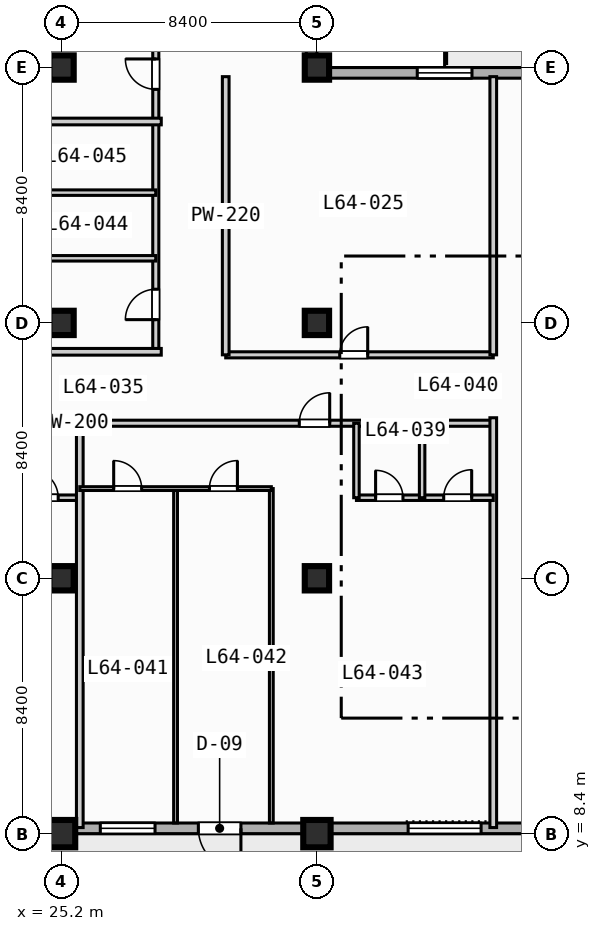
"""IFC4 building model, lengths in metres.
Left out: names, types, materials, properties, quantities, classifications, styles, units other than length and angle.
Written with IfcOpenShell. Run it as: python <this file> out.ifc"""

import sys

from ifc_helpers import new_model, si_unit, direction, frame, frame_2d, origin, origin_2d, place, context, subcontext, project, spatial, rectangle, extrude, element, fill, save


model = new_model("IFC4")
c1 = context("Model", 3, precision=1e-05, world=origin(), true_north=direction((0.0, 1.0)))
c2 = subcontext(c1, "Body", "Model", "MODEL_VIEW")
j1 = project(units=[si_unit("LENGTHUNIT", "METRE"), si_unit("PLANEANGLEUNIT", "RADIAN")], contexts=[c1])
p1 = place(None, origin())
s1 = spatial("IfcSite", under=j1, at=p1, CompositionType="ELEMENT")
p2 = place(p1, origin())
s2 = spatial("IfcBuilding", under=s1, at=p2, CompositionType="ELEMENT")
p3 = place(p2, frame((0.0, 0.0, 260.1)))
s3 = spatial("IfcBuildingStorey", under=s2, at=p3, CompositionType="ELEMENT", Elevation=260.1)
p4 = place(p3, frame((25.2, 8.4, 0.0), z_axis=(0.0, 0.0, 1.0), x_axis=(1.0, 0.0, 0.0)))
e1 = element("IfcColumn", 1, at=p4, inside=s3, PredefinedType="COLUMN", context=c2, shape_type="SweptSolid", body=[
    extrude(rectangle(XDim=0.9, YDim=0.9, at=origin_2d()), origin(), (0.0, 0.0, 1.0), 3.7),
])
for number, where, z_axis, x_axis in (
    (2, (25.2, 16.8, 0.0), (0.0, 0.0, 1.0), (1.0, 0.0, 0.0)),
    (3, (25.2, 25.2, 0.0), (0.0, 0.0, 1.0), (1.0, 0.0, 0.0)),
    (4, (25.2, 33.6, 0.0), (0.0, 0.0, 1.0), (1.0, 0.0, 0.0)),
):
    element("IfcColumn", number, at=place(p3, frame(where, z_axis=z_axis, x_axis=x_axis)), inside=s3, PredefinedType="COLUMN", context=c2, shape_type="SweptSolid", body=[
        extrude(rectangle(XDim=0.8, YDim=0.8, at=origin_2d()), origin(), (0.0, 0.0, 1.0), 3.7),
    ])
p5 = place(p3, frame((33.6, 8.4, 0.0), z_axis=(0.0, 0.0, 1.0), x_axis=(1.0, 0.0, 0.0)))
e5 = element("IfcColumn", 5, at=p5, inside=s3, PredefinedType="COLUMN", context=c2, shape_type="SweptSolid", body=[
    extrude(rectangle(XDim=0.9, YDim=0.9, at=origin_2d()), origin(), (0.0, 0.0, 1.0), 3.7),
])
for number, where, z_axis, x_axis in (
    (6, (33.6, 16.8, 0.0), (0.0, 0.0, 1.0), (1.0, 0.0, 0.0)),
    (7, (33.6, 25.2, 0.0), (0.0, 0.0, 1.0), (1.0, 0.0, 0.0)),
    (8, (33.6, 33.6, 0.0), (0.0, 0.0, 1.0), (1.0, 0.0, 0.0)),
):
    element("IfcColumn", number, at=place(p3, frame(where, z_axis=z_axis, x_axis=x_axis)), inside=s3, PredefinedType="COLUMN", context=c2, shape_type="SweptSolid", body=[
        extrude(rectangle(XDim=0.8, YDim=0.8, at=origin_2d()), origin(), (0.0, 0.0, 1.0), 3.7),
    ])
p6 = place(p3, frame((33.425, 72.425, 0.0), z_axis=(0.0, 0.0, 1.0), x_axis=(0.0, -1.0, 0.0)))
e9 = element("IfcWall", 9, at=p6, inside=s3, PredefinedType="STANDARD", context=c2, shape_type="SweptSolid", body=[
    extrude(rectangle(XDim=39.0, YDim=0.35, at=frame_2d((19.5, 0.0))), origin(), (0.0, 0.0, 1.0), 3.47),
])
p7 = place(p6, frame((5.9, 0.0, 0.85)))
e10 = element("IfcOpeningElement", 10, at=p7, cuts=e9, PredefinedType="OPENING", context=c2, shape_type="SweptSolid", body=[
    extrude(rectangle(XDim=1.8, YDim=1.8, at=frame_2d((0.9, 0.9))), frame((0.0, 0.185, 0.0), z_axis=(0.0, -1.0, 0.0), x_axis=(1.0, 0.0, 0.0)), (0.0, 0.0, 1.0), 0.37),
])
p8 = place(p3, frame((33.425, 33.425, 0.0), z_axis=(0.0, 0.0, 1.0), x_axis=(1.0, 0.0, 0.0)))
e11 = element("IfcWall", 11, at=p8, inside=s3, PredefinedType="STANDARD", context=c2, shape_type="SweptSolid", body=[
    extrude(rectangle(XDim=39.0, YDim=0.35, at=frame_2d((19.5, 0.0))), origin(), (0.0, 0.0, 1.0), 3.47),
])
p9 = place(p8, frame((12.075, 0.0, 0.0)))
e12 = element("IfcOpeningElement", 12, at=p9, cuts=e11, PredefinedType="OPENING", context=c2, shape_type="SweptSolid", body=[
    extrude(rectangle(XDim=1.4, YDim=2.2, at=frame_2d((0.7, 1.1))), frame((0.0, 0.185, 0.0), z_axis=(0.0, -1.0, 0.0), x_axis=(1.0, 0.0, 0.0)), (0.0, 0.0, 1.0), 0.37),
])
p10 = place(p8, frame((3.475, 0.0, 0.85)))
e13 = element("IfcOpeningElement", 13, at=p10, cuts=e11, PredefinedType="OPENING", context=c2, shape_type="SweptSolid", body=[
    extrude(rectangle(XDim=1.8, YDim=1.8, at=frame_2d((0.9, 0.9))), frame((0.0, 0.185, 0.0), z_axis=(0.0, -1.0, 0.0), x_axis=(1.0, 0.0, 0.0)), (0.0, 0.0, 1.0), 0.37),
])
p11 = place(p3, frame((72.425, 8.575, 0.0), z_axis=(0.0, 0.0, 1.0), x_axis=(-1.0, 0.0, 0.0)))
e14 = element("IfcWall", 14, at=p11, inside=s3, PredefinedType="STANDARD", context=c2, shape_type="SweptSolid", body=[
    extrude(rectangle(XDim=60.85, YDim=0.35, at=frame_2d((30.425, 0.0))), origin(), (0.0, 0.0, 1.0), 3.47),
])
p12 = place(p11, frame((41.325, 0.0, 0.0)))
e15 = element("IfcOpeningElement", 15, at=p12, cuts=e14, PredefinedType="OPENING", context=c2, shape_type="SweptSolid", body=[
    extrude(rectangle(XDim=1.4, YDim=2.2, at=frame_2d((0.7, 1.1))), frame((0.0, 0.185, 0.0), z_axis=(0.0, -1.0, 0.0), x_axis=(1.0, 0.0, 0.0)), (0.0, 0.0, 1.0), 0.37),
])
p13 = place(p11, frame((50.225, 0.0, 0.85)))
e16 = element("IfcOpeningElement", 16, at=p13, cuts=e14, PredefinedType="OPENING", context=c2, shape_type="SweptSolid", body=[
    extrude(rectangle(XDim=2.4, YDim=1.95, at=frame_2d((1.2, 0.975))), frame((0.0, 0.185, 0.0), z_axis=(0.0, -1.0, 0.0), x_axis=(1.0, 0.0, 0.0)), (0.0, 0.0, 1.0), 0.37),
])
p14 = place(p11, frame((33.425, 0.0, 0.85)))
e17 = element("IfcOpeningElement", 17, at=p14, cuts=e14, PredefinedType="OPENING", context=c2, shape_type="SweptSolid", body=[
    extrude(rectangle(XDim=2.4, YDim=1.95, at=frame_2d((1.2, 0.975))), frame((0.0, 0.185, 0.0), z_axis=(0.0, -1.0, 0.0), x_axis=(1.0, 0.0, 0.0)), (0.0, 0.0, 1.0), 0.37),
])
p15 = place(p11, frame((25.325, 0.0, 0.85)))
e18 = element("IfcOpeningElement", 18, at=p15, cuts=e14, PredefinedType="OPENING", context=c2, shape_type="SweptSolid", body=[
    extrude(rectangle(XDim=1.8, YDim=1.8, at=frame_2d((0.9, 0.9))), frame((0.0, 0.185, 0.0), z_axis=(0.0, -1.0, 0.0), x_axis=(1.0, 0.0, 0.0)), (0.0, 0.0, 1.0), 0.37),
])
p16 = place(p11, frame((58.15, 0.0, 0.85)))
e19 = element("IfcOpeningElement", 19, at=p16, cuts=e14, PredefinedType="OPENING", context=c2, shape_type="SweptSolid", body=[
    extrude(rectangle(XDim=1.8, YDim=1.8, at=frame_2d((0.9, 0.9))), frame((0.0, 0.185, 0.0), z_axis=(0.0, -1.0, 0.0), x_axis=(1.0, 0.0, 0.0)), (0.0, 0.0, 1.0), 0.37),
])
p17 = place(p11, frame((56.29, 0.0, 0.85)))
e20 = element("IfcOpeningElement", 20, at=p17, cuts=e14, PredefinedType="OPENING", context=c2, shape_type="SweptSolid", body=[
    extrude(rectangle(XDim=0.72, YDim=1.8, at=frame_2d((0.36, 0.9))), frame((0.0, 0.185, 0.0), z_axis=(0.0, -1.0, 0.0), x_axis=(1.0, 0.0, 0.0)), (0.0, 0.0, 1.0), 0.37),
])
p18 = place(p11, frame((44.15, 0.0, 0.85)))
e21 = element("IfcOpeningElement", 21, at=p18, cuts=e14, PredefinedType="OPENING", context=c2, shape_type="SweptSolid", body=[
    extrude(rectangle(XDim=1.8, YDim=1.8, at=frame_2d((0.9, 0.9))), frame((0.0, 0.185, 0.0), z_axis=(0.0, -1.0, 0.0), x_axis=(1.0, 0.0, 0.0)), (0.0, 0.0, 1.0), 0.37),
])
p19 = place(p3, frame((30.6, 24.15, 0.0), z_axis=(0.0, 0.0, 1.0), x_axis=(1.0, 0.0, 0.0)))
e22 = element("IfcWall", 22, at=p19, inside=s3, PredefinedType="PARTITIONING", context=c2, shape_type="SweptSolid", body=[
    extrude(rectangle(XDim=8.8, YDim=0.2, at=frame_2d((4.4, 0.0))), origin(), (0.0, 0.0, 1.0), 3.47),
])
p20 = place(p19, frame((3.75, 0.0, 0.0)))
e23 = element("IfcOpeningElement", 23, at=p20, cuts=e22, PredefinedType="OPENING", context=c2, shape_type="SweptSolid", body=[
    extrude(rectangle(XDim=0.92, YDim=2.1, at=frame_2d((0.46, 1.05))), frame((0.0, 0.11, 0.0), z_axis=(0.0, -1.0, 0.0), x_axis=(1.0, 0.0, 0.0)), (0.0, 0.0, 1.0), 0.22),
])
for number, where, z_axis, x_axis in (
    (24, (30.6, 24.15, 0.0), (0.0, 0.0, 1.0), (0.0, 1.0, 0.0)),
    (25, (39.4, 24.15, 0.0), (0.0, 0.0, 1.0), (0.0, 1.0, 0.0)),
):
    element("IfcWall", number, at=place(p3, frame(where, z_axis=z_axis, x_axis=x_axis)), inside=s3, PredefinedType="PARTITIONING", context=c2, shape_type="SweptSolid", body=[
        extrude(rectangle(XDim=9.15, YDim=0.22, at=frame_2d((4.575, 0.0))), origin(), (0.0, 0.0, 1.0), 3.47),
    ])
p21 = place(p3, frame((11.8, 21.9, 0.0), z_axis=(0.0, 0.0, 1.0), x_axis=(1.0, 0.0, 0.0)))
e26 = element("IfcWall", 26, at=p21, inside=s3, PredefinedType="PARTITIONING", context=c2, shape_type="SweptSolid", body=[
    extrude(rectangle(XDim=27.6, YDim=0.2, at=frame_2d((13.8, 0.0))), origin(), (0.0, 0.0, 1.0), 3.47),
])
p22 = place(p21, frame((7.42, 0.0, 0.0)))
e27 = element("IfcOpeningElement", 27, at=p22, cuts=e26, PredefinedType="OPENING", context=c2, shape_type="SweptSolid", body=[
    extrude(rectangle(XDim=1.0, YDim=2.15, at=frame_2d((0.5, 1.075))), frame((0.0, 0.11, 0.0), z_axis=(0.0, -1.0, 0.0), x_axis=(1.0, 0.0, 0.0)), (0.0, 0.0, 1.0), 0.22),
])
p23 = place(p21, frame((21.22, 0.0, 0.0)))
e28 = element("IfcOpeningElement", 28, at=p23, cuts=e26, PredefinedType="OPENING", context=c2, shape_type="SweptSolid", body=[
    extrude(rectangle(XDim=1.0, YDim=2.15, at=frame_2d((0.5, 1.075))), frame((0.0, 0.11, 0.0), z_axis=(0.0, -1.0, 0.0), x_axis=(1.0, 0.0, 0.0)), (0.0, 0.0, 1.0), 0.22),
])
p24 = place(p3, frame((21.3, 19.45, 0.0), z_axis=(0.0, 0.0, 1.0), x_axis=(1.0, 0.0, 0.0)))
e29 = element("IfcWall", 29, at=p24, inside=s3, PredefinedType="PLUMBINGWALL", context=c2, shape_type="SweptSolid", body=[
    extrude(rectangle(XDim=4.5, YDim=0.18, at=frame_2d((2.25, 0.0))), origin(), (0.0, 0.0, 1.0), 3.47),
])
p25 = place(p24, frame((0.63, 0.0, 0.0)))
e30 = element("IfcOpeningElement", 30, at=p25, cuts=e29, PredefinedType="OPENING", context=c2, shape_type="SweptSolid", body=[
    extrude(rectangle(XDim=0.9, YDim=2.1, at=frame_2d((0.45, 1.05))), frame((0.0, 0.1, 0.0), z_axis=(0.0, -1.0, 0.0), x_axis=(1.0, 0.0, 0.0)), (0.0, 0.0, 1.0), 0.2),
])
p26 = place(p24, frame((2.87, 0.0, 0.0)))
e31 = element("IfcOpeningElement", 31, at=p26, cuts=e29, PredefinedType="OPENING", context=c2, shape_type="SweptSolid", body=[
    extrude(rectangle(XDim=0.92, YDim=2.1, at=frame_2d((0.46, 1.05))), frame((0.0, 0.1, 0.0), z_axis=(0.0, -1.0, 0.0), x_axis=(1.0, 0.0, 0.0)), (0.0, 0.0, 1.0), 0.2),
])
for number, where, z_axis, x_axis in (
    (32, (25.8, 8.6, 0.0), (0.0, 0.0, 1.0), (0.0, 1.0, 0.0)),
    (33, (39.4, 8.6, 0.0), (0.0, 0.0, 1.0), (0.0, 1.0, 0.0)),
):
    element("IfcWall", number, at=place(p3, frame(where, z_axis=z_axis, x_axis=x_axis)), inside=s3, PredefinedType="PARTITIONING", context=c2, shape_type="SweptSolid", body=[
        extrude(rectangle(XDim=13.48, YDim=0.22, at=frame_2d((6.74, 0.0))), origin(), (0.0, 0.0, 1.0), 3.47),
    ])
p27 = place(p3, frame((34.9, 19.45, 0.0), z_axis=(0.0, 0.0, 1.0), x_axis=(1.0, 0.0, 0.0)))
e34 = element("IfcWall", 34, at=p27, inside=s3, PredefinedType="PLUMBINGWALL", context=c2, shape_type="SweptSolid", body=[
    extrude(rectangle(XDim=4.5, YDim=0.18, at=frame_2d((2.25, 0.0))), origin(), (0.0, 0.0, 1.0), 3.47),
])
p28 = place(p27, frame((0.63, 0.0, 0.0)))
e35 = element("IfcOpeningElement", 35, at=p28, cuts=e34, PredefinedType="OPENING", context=c2, shape_type="SweptSolid", body=[
    extrude(rectangle(XDim=0.9, YDim=2.1, at=frame_2d((0.45, 1.05))), frame((0.0, 0.1, 0.0), z_axis=(0.0, -1.0, 0.0), x_axis=(1.0, 0.0, 0.0)), (0.0, 0.0, 1.0), 0.2),
])
p29 = place(p27, frame((2.87, 0.0, 0.0)))
e36 = element("IfcOpeningElement", 36, at=p29, cuts=e34, PredefinedType="OPENING", context=c2, shape_type="SweptSolid", body=[
    extrude(rectangle(XDim=0.92, YDim=2.1, at=frame_2d((0.46, 1.05))), frame((0.0, 0.1, 0.0), z_axis=(0.0, -1.0, 0.0), x_axis=(1.0, 0.0, 0.0)), (0.0, 0.0, 1.0), 0.2),
])
for number, where, z_axis, x_axis in (
    (37, (34.9, 19.45, 0.0), (0.0, 0.0, 1.0), (0.0, 1.0, 0.0)),
    (38, (37.06, 19.45, 0.0), (0.0, 0.0, 1.0), (0.0, 1.0, 0.0)),
):
    element("IfcWall", number, at=place(p3, frame(where, z_axis=z_axis, x_axis=x_axis)), inside=s3, PredefinedType="PLUMBINGWALL", context=c2, shape_type="SweptSolid", body=[
        extrude(rectangle(XDim=2.45, YDim=0.18, at=frame_2d((1.225, 0.0))), origin(), (0.0, 0.0, 1.0), 3.47),
    ])
for number, where, z_axis, x_axis in (
    (39, (28.95, 8.75, 0.0), (0.0, 0.0, 1.0), (0.0, 1.0, 0.0)),
    (40, (32.1, 8.75, 0.0), (0.0, 0.0, 1.0), (0.0, 1.0, 0.0)),
):
    element("IfcWall", number, at=place(p3, frame(where, z_axis=z_axis, x_axis=x_axis)), inside=s3, PredefinedType="PARTITIONING", context=c2, shape_type="SweptSolid", body=[
        extrude(rectangle(XDim=11.0, YDim=0.125, at=frame_2d((5.5, 0.0))), origin(), (0.0, 0.0, 1.0), 3.47),
    ])
p30 = place(p3, frame((25.8, 19.75, 0.0), z_axis=(0.0, 0.0, 1.0), x_axis=(1.0, 0.0, 0.0)))
e41 = element("IfcWall", 41, at=p30, inside=s3, PredefinedType="PARTITIONING", context=c2, shape_type="SweptSolid", body=[
    extrude(rectangle(XDim=6.3, YDim=0.125, at=frame_2d((3.15, 0.0))), origin(), (0.0, 0.0, 1.0), 3.47),
])
p31 = place(p30, frame((1.115, 0.0, 0.0)))
e42 = element("IfcOpeningElement", 42, at=p31, cuts=e41, PredefinedType="OPENING", context=c2, shape_type="SweptSolid", body=[
    extrude(rectangle(XDim=0.92, YDim=2.1, at=frame_2d((0.46, 1.05))), frame((0.0, 0.073, 0.0), z_axis=(0.0, -1.0, 0.0), x_axis=(1.0, 0.0, 0.0)), (0.0, 0.0, 1.0), 0.145),
])
p32 = place(p30, frame((4.265, 0.0, 0.0)))
e43 = element("IfcOpeningElement", 43, at=p32, cuts=e41, PredefinedType="OPENING", context=c2, shape_type="SweptSolid", body=[
    extrude(rectangle(XDim=0.92, YDim=2.1, at=frame_2d((0.46, 1.05))), frame((0.0, 0.073, 0.0), z_axis=(0.0, -1.0, 0.0), x_axis=(1.0, 0.0, 0.0)), (0.0, 0.0, 1.0), 0.145),
])
p33 = place(p3, frame((28.3, 24.25, 0.0), z_axis=(0.0, 0.0, 1.0), x_axis=(0.0, 1.0, 0.0)))
e44 = element("IfcWall", 44, at=p33, inside=s3, PredefinedType="PARTITIONING", context=c2, shape_type="SweptSolid", body=[
    extrude(rectangle(XDim=15.15, YDim=0.2, at=frame_2d((7.575, 0.0))), origin(), (0.0, 0.0, 1.0), 3.47),
])
p34 = place(p33, frame((1.058, 0.0, 0.0)))
e45 = element("IfcOpeningElement", 45, at=p34, cuts=e44, PredefinedType="OPENING", context=c2, shape_type="SweptSolid", body=[
    extrude(rectangle(XDim=1.0, YDim=2.15, at=frame_2d((0.5, 1.075))), frame((0.0, 0.11, 0.0), z_axis=(0.0, -1.0, 0.0), x_axis=(1.0, 0.0, 0.0)), (0.0, 0.0, 1.0), 0.22),
])
p35 = place(p33, frame((8.633, 0.0, 0.0)))
e46 = element("IfcOpeningElement", 46, at=p35, cuts=e44, PredefinedType="OPENING", context=c2, shape_type="SweptSolid", body=[
    extrude(rectangle(XDim=1.0, YDim=2.15, at=frame_2d((0.5, 1.075))), frame((0.0, 0.11, 0.0), z_axis=(0.0, -1.0, 0.0), x_axis=(1.0, 0.0, 0.0)), (0.0, 0.0, 1.0), 0.22),
])
p36 = place(p3, frame((8.6, 24.25, 0.0), z_axis=(0.0, 0.0, 1.0), x_axis=(1.0, 0.0, 0.0)))
e47 = element("IfcWall", 47, at=p36, inside=s3, PredefinedType="PARTITIONING", context=c2, shape_type="SweptSolid", body=[
    extrude(rectangle(XDim=19.88, YDim=0.22, at=frame_2d((9.94, 0.0))), origin(), (0.0, 0.0, 1.0), 3.47),
])
for number, where, z_axis, x_axis in (
    (48, (23.15, 27.325, 0.0), (0.0, 0.0, 1.0), (1.0, 0.0, 0.0)),
    (49, (23.15, 29.485, 0.0), (0.0, 0.0, 1.0), (1.0, 0.0, 0.0)),
):
    element("IfcWall", number, at=place(p3, frame(where, z_axis=z_axis, x_axis=x_axis)), inside=s3, PredefinedType="PLUMBINGWALL", context=c2, shape_type="SweptSolid", body=[
        extrude(rectangle(XDim=5.15, YDim=0.18, at=frame_2d((2.575, 0.0))), origin(), (0.0, 0.0, 1.0), 3.47),
    ])
p37 = place(p3, frame((8.6, 31.825, 0.0), z_axis=(0.0, 0.0, 1.0), x_axis=(1.0, 0.0, 0.0)))
e50 = element("IfcWall", 50, at=p37, inside=s3, PredefinedType="PARTITIONING", context=c2, shape_type="SweptSolid", body=[
    extrude(rectangle(XDim=19.88, YDim=0.22, at=frame_2d((9.94, 0.0))), origin(), (0.0, 0.0, 1.0), 3.47),
])
p38 = place(p10, origin())
e51 = element("IfcWindow", 51, at=p38, inside=s3, PartitioningType="SINGLE_PANEL", PredefinedType="WINDOW", context=c2, shape_type="SweptSolid", body=[
    extrude(rectangle(XDim=1.8, YDim=1.8, at=frame_2d((0.9, 0.9))), frame((0.0, 0.03, 0.0), z_axis=(0.0, -1.0, 0.0), x_axis=(1.0, 0.0, 0.0)), (0.0, 0.0, 1.0), 0.06),
])
fill(e13, e51)
p39 = place(p12, origin())
e52 = element("IfcDoor", 52, at=p39, inside=s3, OperationType="SINGLE_SWING_LEFT", PredefinedType="DOOR", context=c2, shape_type="SweptSolid", body=[
    extrude(rectangle(XDim=1.4, YDim=2.2, at=frame_2d((0.7, 1.1))), frame((0.0, 0.025, 0.0), z_axis=(0.0, -1.0, 0.0), x_axis=(1.0, 0.0, 0.0)), (0.0, 0.0, 1.0), 0.05),
])
fill(e15, e52)
p40 = place(p14, origin())
e53 = element("IfcWindow", 53, at=p40, inside=s3, PartitioningType="SINGLE_PANEL", PredefinedType="WINDOW", context=c2, shape_type="SweptSolid", body=[
    extrude(rectangle(XDim=2.4, YDim=1.95, at=frame_2d((1.2, 0.975))), frame((0.0, 0.03, 0.0), z_axis=(0.0, -1.0, 0.0), x_axis=(1.0, 0.0, 0.0)), (0.0, 0.0, 1.0), 0.06),
])
fill(e17, e53)
p41 = place(p18, origin())
e54 = element("IfcWindow", 54, at=p41, inside=s3, PartitioningType="SINGLE_PANEL", PredefinedType="WINDOW", context=c2, shape_type="SweptSolid", body=[
    extrude(rectangle(XDim=1.8, YDim=1.8, at=frame_2d((0.9, 0.9))), frame((0.0, 0.03, 0.0), z_axis=(0.0, -1.0, 0.0), x_axis=(1.0, 0.0, 0.0)), (0.0, 0.0, 1.0), 0.06),
])
fill(e21, e54)
p42 = place(p20, origin())
e55 = element("IfcDoor", 55, at=p42, inside=s3, OperationType="SINGLE_SWING_RIGHT", PredefinedType="DOOR", context=c2, shape_type="SweptSolid", body=[
    extrude(rectangle(XDim=0.92, YDim=2.1, at=frame_2d((0.46, 1.05))), frame((0.0, 0.025, 0.0), z_axis=(0.0, -1.0, 0.0), x_axis=(1.0, 0.0, 0.0)), (0.0, 0.0, 1.0), 0.05),
])
fill(e23, e55)
p43 = place(p23, origin())
e56 = element("IfcDoor", 56, at=p43, inside=s3, OperationType="SINGLE_SWING_RIGHT", PredefinedType="DOOR", context=c2, shape_type="SweptSolid", body=[
    extrude(rectangle(XDim=1.0, YDim=2.15, at=frame_2d((0.5, 1.075))), frame((0.0, 0.025, 0.0), z_axis=(0.0, -1.0, 0.0), x_axis=(1.0, 0.0, 0.0)), (0.0, 0.0, 1.0), 0.05),
])
fill(e28, e56)
p44 = place(p26, origin())
e57 = element("IfcDoor", 57, at=p44, inside=s3, OperationType="SINGLE_SWING_LEFT", PredefinedType="DOOR", context=c2, shape_type="SweptSolid", body=[
    extrude(rectangle(XDim=0.92, YDim=2.1, at=frame_2d((0.46, 1.05))), frame((0.0, 0.025, 0.0), z_axis=(0.0, -1.0, 0.0), x_axis=(1.0, 0.0, 0.0)), (0.0, 0.0, 1.0), 0.05),
])
fill(e31, e57)
p45 = place(p28, origin())
e58 = element("IfcDoor", 58, at=p45, inside=s3, OperationType="SINGLE_SWING_LEFT", PredefinedType="DOOR", context=c2, shape_type="SweptSolid", body=[
    extrude(rectangle(XDim=0.9, YDim=2.1, at=frame_2d((0.45, 1.05))), frame((0.0, 0.025, 0.0), z_axis=(0.0, -1.0, 0.0), x_axis=(1.0, 0.0, 0.0)), (0.0, 0.0, 1.0), 0.05),
])
fill(e35, e58)
p46 = place(p29, origin())
e59 = element("IfcDoor", 59, at=p46, inside=s3, OperationType="SINGLE_SWING_RIGHT", PredefinedType="DOOR", context=c2, shape_type="SweptSolid", body=[
    extrude(rectangle(XDim=0.92, YDim=2.1, at=frame_2d((0.46, 1.05))), frame((0.0, 0.025, 0.0), z_axis=(0.0, -1.0, 0.0), x_axis=(1.0, 0.0, 0.0)), (0.0, 0.0, 1.0), 0.05),
])
fill(e36, e59)
p47 = place(p31, origin())
e60 = element("IfcDoor", 60, at=p47, inside=s3, OperationType="SINGLE_SWING_LEFT", PredefinedType="DOOR", context=c2, shape_type="SweptSolid", body=[
    extrude(rectangle(XDim=0.92, YDim=2.1, at=frame_2d((0.46, 1.05))), frame((0.0, 0.025, 0.0), z_axis=(0.0, -1.0, 0.0), x_axis=(1.0, 0.0, 0.0)), (0.0, 0.0, 1.0), 0.05),
])
fill(e42, e60)
p48 = place(p32, origin())
e61 = element("IfcDoor", 61, at=p48, inside=s3, OperationType="SINGLE_SWING_RIGHT", PredefinedType="DOOR", context=c2, shape_type="SweptSolid", body=[
    extrude(rectangle(XDim=0.92, YDim=2.1, at=frame_2d((0.46, 1.05))), frame((0.0, 0.025, 0.0), z_axis=(0.0, -1.0, 0.0), x_axis=(1.0, 0.0, 0.0)), (0.0, 0.0, 1.0), 0.05),
])
fill(e43, e61)
p49 = place(p34, origin())
e62 = element("IfcDoor", 62, at=p49, inside=s3, OperationType="SINGLE_SWING_LEFT", PredefinedType="DOOR", context=c2, shape_type="SweptSolid", body=[
    extrude(rectangle(XDim=1.0, YDim=2.15, at=frame_2d((0.5, 1.075))), frame((0.0, 0.025, 0.0), z_axis=(0.0, -1.0, 0.0), x_axis=(1.0, 0.0, 0.0)), (0.0, 0.0, 1.0), 0.05),
])
fill(e45, e62)
p50 = place(p35, origin())
e63 = element("IfcDoor", 63, at=p50, inside=s3, OperationType="SINGLE_SWING_RIGHT", PredefinedType="DOOR", context=c2, shape_type="SweptSolid", body=[
    extrude(rectangle(XDim=1.0, YDim=2.15, at=frame_2d((0.5, 1.075))), frame((0.0, 0.025, 0.0), z_axis=(0.0, -1.0, 0.0), x_axis=(1.0, 0.0, 0.0)), (0.0, 0.0, 1.0), 0.05),
])
fill(e46, e63)
save(model, sys.argv[1])
